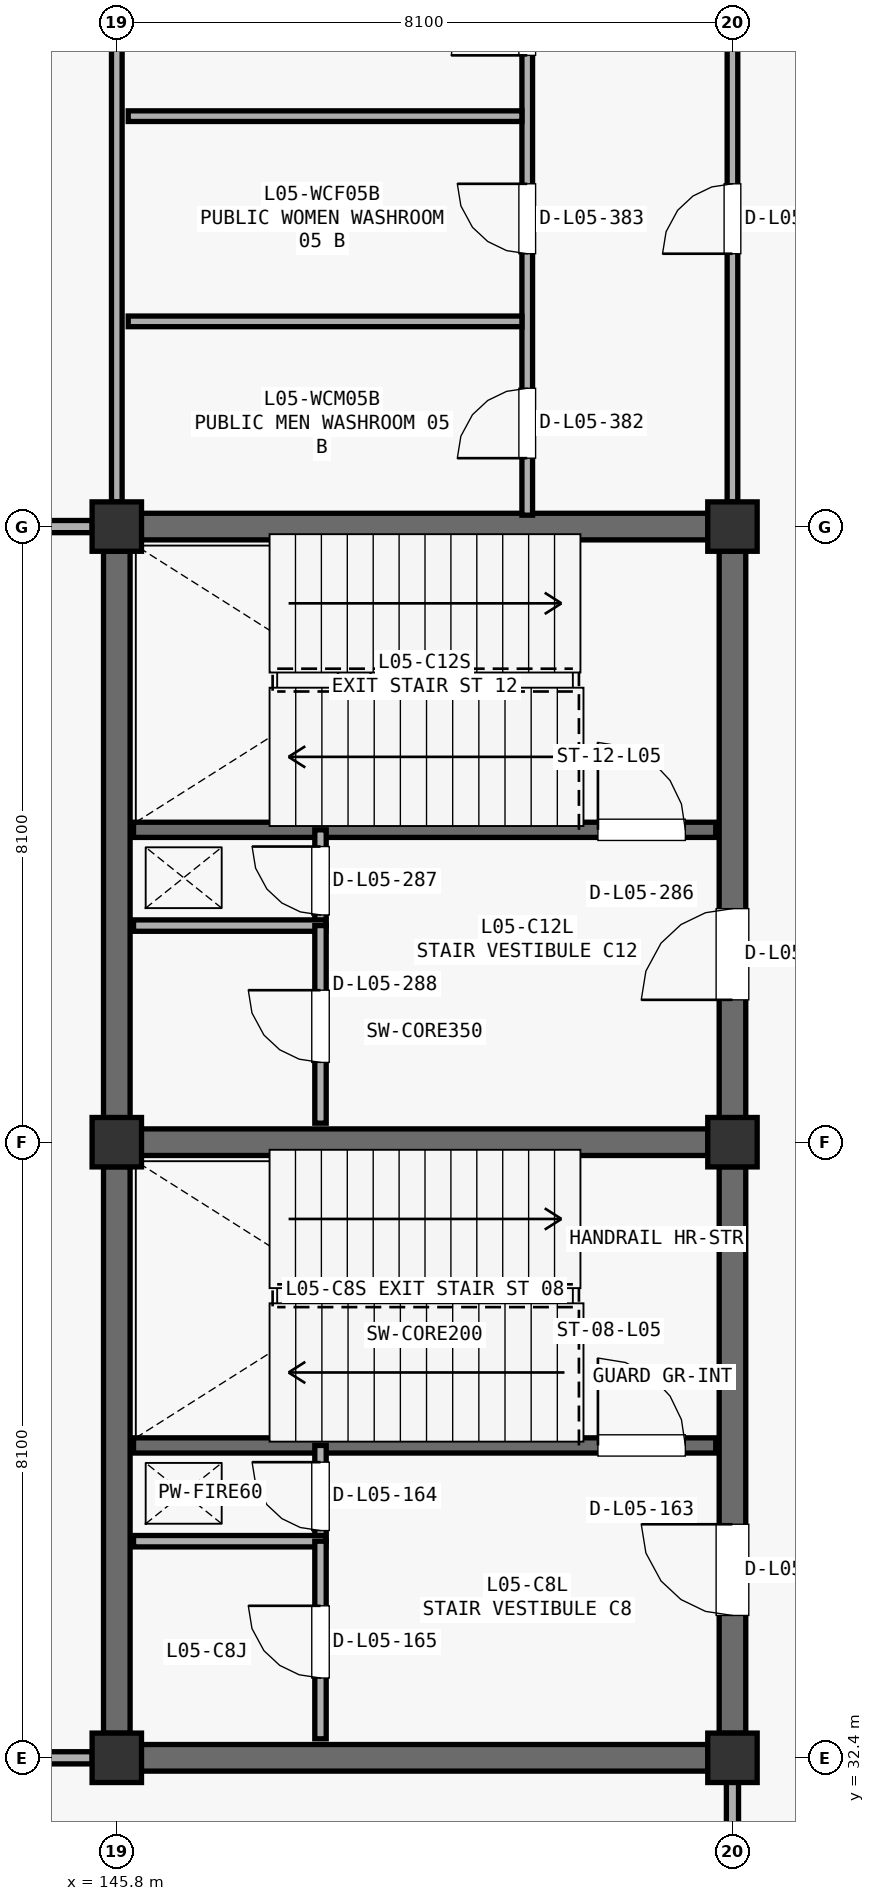
"""IFC4 building model, lengths in metres.
Left out: names, types, materials, properties, quantities, classifications, styles, units other than length and angle.
Written with IfcOpenShell. Run it as: python <this file> out.ifc"""

import sys

from ifc_helpers import new_model, si_unit, direction, frame, frame_2d, origin, origin_2d, place, context, subcontext, project, spatial, rectangle, extrude, element, fill, save


model = new_model("IFC4")
c1 = context("Model", 3, precision=1e-05, world=origin(), true_north=direction((0.0, 1.0)))
c2 = subcontext(c1, "Body", "Model", "MODEL_VIEW")
j1 = project(units=[si_unit("LENGTHUNIT", "METRE"), si_unit("PLANEANGLEUNIT", "RADIAN")], contexts=[c1])
p1 = place(None, origin())
s1 = spatial("IfcSite", under=j1, at=p1, CompositionType="ELEMENT")
p2 = place(p1, origin())
s2 = spatial("IfcBuilding", under=s1, at=p2, CompositionType="ELEMENT")
p3 = place(p2, frame((0.0, 0.0, 22.95)))
s3 = spatial("IfcBuildingStorey", under=s2, at=p3, CompositionType="ELEMENT", Elevation=22.95)
for number, where, z_axis, x_axis in (
    (1, (145.8, 32.4, 0.0), (0.0, 0.0, 1.0), (1.0, 0.0, 0.0)),
    (2, (145.8, 40.5, 0.0), (0.0, 0.0, 1.0), (1.0, 0.0, 0.0)),
    (3, (145.8, 48.6, 0.0), (0.0, 0.0, 1.0), (1.0, 0.0, 0.0)),
    (4, (153.9, 32.4, 0.0), (0.0, 0.0, 1.0), (1.0, 0.0, 0.0)),
    (5, (153.9, 40.5, 0.0), (0.0, 0.0, 1.0), (1.0, 0.0, 0.0)),
    (6, (153.9, 48.6, 0.0), (0.0, 0.0, 1.0), (1.0, 0.0, 0.0)),
):
    element("IfcColumn", number, at=place(p3, frame(where, z_axis=z_axis, x_axis=x_axis)), inside=s3, PredefinedType="COLUMN", context=c2, shape_type="SweptSolid", body=[
        extrude(rectangle(XDim=0.65, YDim=0.65, at=origin_2d()), origin(), (0.0, 0.0, 1.0), 4.42),
    ])
p4 = place(p3, frame((146.123, 40.5, 0.0), z_axis=(0.0, 0.0, 1.0), x_axis=(1.0, 0.0, 0.0)))
e7 = element("IfcWall", 7, at=p4, inside=s3, PredefinedType="SHEAR", context=c2, shape_type="SweptSolid", body=[
    extrude(rectangle(XDim=7.454, YDim=0.35, at=frame_2d((3.727, 0.0))), origin(), (0.0, 0.0, 1.0), 4.162),
])
p5 = place(p3, frame((145.8, 32.723, 0.0), z_axis=(0.0, 0.0, 1.0), x_axis=(0.0, 1.0, 0.0)))
e8 = element("IfcWall", 8, at=p5, inside=s3, PredefinedType="SHEAR", context=c2, shape_type="SweptSolid", body=[
    extrude(rectangle(XDim=7.454, YDim=0.35, at=frame_2d((3.727, 0.0))), origin(), (0.0, 0.0, 1.0), 4.162),
])
p6 = place(p3, frame((153.9, 32.723, 0.0), z_axis=(0.0, 0.0, 1.0), x_axis=(0.0, 1.0, 0.0)))
e9 = element("IfcWall", 9, at=p6, inside=s3, PredefinedType="SHEAR", context=c2, shape_type="SweptSolid", body=[
    extrude(rectangle(XDim=7.454, YDim=0.35, at=frame_2d((3.727, 0.0))), origin(), (0.0, 0.0, 1.0), 4.162),
])
p7 = place(p6, frame((1.55, 0.0, 0.0)))
e10 = element("IfcOpeningElement", 10, at=p7, cuts=e9, PredefinedType="OPENING", context=c2, shape_type="SweptSolid", body=[
    extrude(rectangle(XDim=1.2, YDim=2.2, at=frame_2d((0.6, 1.1))), frame((0.0, 0.185, 0.0), z_axis=(0.0, -1.0, 0.0), x_axis=(1.0, 0.0, 0.0)), (0.0, 0.0, 1.0), 0.37),
])
p8 = place(p3, frame((146.123, 32.4, 0.0), z_axis=(0.0, 0.0, 1.0), x_axis=(1.0, 0.0, 0.0)))
e11 = element("IfcWall", 11, at=p8, inside=s3, PredefinedType="SHEAR", context=c2, shape_type="SweptSolid", body=[
    extrude(rectangle(XDim=7.454, YDim=0.35, at=frame_2d((3.727, 0.0))), origin(), (0.0, 0.0, 1.0), 4.162),
])
p9 = place(p3, frame((146.02, 36.51, 0.0), z_axis=(0.0, 0.0, 1.0), x_axis=(1.0, 0.0, 0.0)))
e12 = element("IfcWall", 12, at=p9, inside=s3, PredefinedType="SHEAR", context=c2, shape_type="SweptSolid", body=[
    extrude(rectangle(XDim=7.66, YDim=0.2, at=frame_2d((3.83, 0.0))), origin(), (0.0, 0.0, 1.0), 4.162),
])
p10 = place(p9, frame((6.11, 0.0, 0.0)))
e13 = element("IfcOpeningElement", 13, at=p10, cuts=e12, PredefinedType="OPENING", context=c2, shape_type="SweptSolid", body=[
    extrude(rectangle(XDim=1.15, YDim=2.2, at=frame_2d((0.575, 1.1))), frame((0.0, 0.11, 0.0), z_axis=(0.0, -1.0, 0.0), x_axis=(1.0, 0.0, 0.0)), (0.0, 0.0, 1.0), 0.22),
])
p11 = place(p3, frame((148.48, 35.25, 0.0), z_axis=(0.0, 0.0, 1.0), x_axis=(0.0, 1.0, 0.0)))
e14 = element("IfcWall", 14, at=p11, inside=s3, PredefinedType="PARTITIONING", context=c2, shape_type="SweptSolid", body=[
    extrude(rectangle(XDim=1.26, YDim=0.15, at=frame_2d((0.63, 0.0))), origin(), (0.0, 0.0, 1.0), 4.162),
])
p12 = place(p11, frame((0.14, 0.0, 0.0)))
e15 = element("IfcOpeningElement", 15, at=p12, cuts=e14, PredefinedType="OPENING", context=c2, shape_type="SweptSolid", body=[
    extrude(rectangle(XDim=0.9, YDim=2.15, at=frame_2d((0.45, 1.075))), frame((0.0, 0.085, 0.0), z_axis=(0.0, -1.0, 0.0), x_axis=(1.0, 0.0, 0.0)), (0.0, 0.0, 1.0), 0.17),
])
p13 = place(p3, frame((146.02, 35.25, 0.0), z_axis=(0.0, 0.0, 1.0), x_axis=(1.0, 0.0, 0.0)))
e16 = element("IfcWall", 16, at=p13, inside=s3, PredefinedType="PARTITIONING", context=c2, shape_type="SweptSolid", body=[
    extrude(rectangle(XDim=2.53, YDim=0.15, at=frame_2d((1.265, 0.0))), origin(), (0.0, 0.0, 1.0), 4.162),
])
p14 = place(p3, frame((148.48, 32.65, 0.0), z_axis=(0.0, 0.0, 1.0), x_axis=(0.0, 1.0, 0.0)))
e17 = element("IfcWall", 17, at=p14, inside=s3, PredefinedType="PARTITIONING", context=c2, shape_type="SweptSolid", body=[
    extrude(rectangle(XDim=2.6, YDim=0.15, at=frame_2d((1.3, 0.0))), origin(), (0.0, 0.0, 1.0), 4.162),
])
p15 = place(p14, frame((0.8, 0.0, 0.0)))
e18 = element("IfcOpeningElement", 18, at=p15, cuts=e17, PredefinedType="OPENING", context=c2, shape_type="SweptSolid", body=[
    extrude(rectangle(XDim=0.95, YDim=2.15, at=frame_2d((0.475, 1.075))), frame((0.0, 0.085, 0.0), z_axis=(0.0, -1.0, 0.0), x_axis=(1.0, 0.0, 0.0)), (0.0, 0.0, 1.0), 0.17),
])
p16 = place(p3, frame((146.123, 48.6, 0.0), z_axis=(0.0, 0.0, 1.0), x_axis=(1.0, 0.0, 0.0)))
e19 = element("IfcWall", 19, at=p16, inside=s3, PredefinedType="SHEAR", context=c2, shape_type="SweptSolid", body=[
    extrude(rectangle(XDim=7.454, YDim=0.35, at=frame_2d((3.727, 0.0))), origin(), (0.0, 0.0, 1.0), 4.162),
])
p17 = place(p3, frame((145.8, 40.823, 0.0), z_axis=(0.0, 0.0, 1.0), x_axis=(0.0, 1.0, 0.0)))
e20 = element("IfcWall", 20, at=p17, inside=s3, PredefinedType="SHEAR", context=c2, shape_type="SweptSolid", body=[
    extrude(rectangle(XDim=7.454, YDim=0.35, at=frame_2d((3.727, 0.0))), origin(), (0.0, 0.0, 1.0), 4.162),
])
p18 = place(p3, frame((153.9, 40.823, 0.0), z_axis=(0.0, 0.0, 1.0), x_axis=(0.0, 1.0, 0.0)))
e21 = element("IfcWall", 21, at=p18, inside=s3, PredefinedType="SHEAR", context=c2, shape_type="SweptSolid", body=[
    extrude(rectangle(XDim=7.454, YDim=0.35, at=frame_2d((3.727, 0.0))), origin(), (0.0, 0.0, 1.0), 4.162),
])
p19 = place(p18, frame((1.55, 0.0, 0.0)))
e22 = element("IfcOpeningElement", 22, at=p19, cuts=e21, PredefinedType="OPENING", context=c2, shape_type="SweptSolid", body=[
    extrude(rectangle(XDim=1.2, YDim=2.2, at=frame_2d((0.6, 1.1))), frame((0.0, 0.185, 0.0), z_axis=(0.0, -1.0, 0.0), x_axis=(1.0, 0.0, 0.0)), (0.0, 0.0, 1.0), 0.37),
])
p20 = place(p3, frame((146.02, 44.61, 0.0), z_axis=(0.0, 0.0, 1.0), x_axis=(1.0, 0.0, 0.0)))
e23 = element("IfcWall", 23, at=p20, inside=s3, PredefinedType="SHEAR", context=c2, shape_type="SweptSolid", body=[
    extrude(rectangle(XDim=7.66, YDim=0.2, at=frame_2d((3.83, 0.0))), origin(), (0.0, 0.0, 1.0), 4.162),
])
p21 = place(p20, frame((6.11, 0.0, 0.0)))
e24 = element("IfcOpeningElement", 24, at=p21, cuts=e23, PredefinedType="OPENING", context=c2, shape_type="SweptSolid", body=[
    extrude(rectangle(XDim=1.15, YDim=2.2, at=frame_2d((0.575, 1.1))), frame((0.0, 0.11, 0.0), z_axis=(0.0, -1.0, 0.0), x_axis=(1.0, 0.0, 0.0)), (0.0, 0.0, 1.0), 0.22),
])
p22 = place(p3, frame((148.48, 43.35, 0.0), z_axis=(0.0, 0.0, 1.0), x_axis=(0.0, 1.0, 0.0)))
e25 = element("IfcWall", 25, at=p22, inside=s3, PredefinedType="PARTITIONING", context=c2, shape_type="SweptSolid", body=[
    extrude(rectangle(XDim=1.26, YDim=0.15, at=frame_2d((0.63, 0.0))), origin(), (0.0, 0.0, 1.0), 4.162),
])
p23 = place(p22, frame((0.14, 0.0, 0.0)))
e26 = element("IfcOpeningElement", 26, at=p23, cuts=e25, PredefinedType="OPENING", context=c2, shape_type="SweptSolid", body=[
    extrude(rectangle(XDim=0.9, YDim=2.15, at=frame_2d((0.45, 1.075))), frame((0.0, 0.085, 0.0), z_axis=(0.0, -1.0, 0.0), x_axis=(1.0, 0.0, 0.0)), (0.0, 0.0, 1.0), 0.17),
])
p24 = place(p3, frame((146.02, 43.35, 0.0), z_axis=(0.0, 0.0, 1.0), x_axis=(1.0, 0.0, 0.0)))
e27 = element("IfcWall", 27, at=p24, inside=s3, PredefinedType="PARTITIONING", context=c2, shape_type="SweptSolid", body=[
    extrude(rectangle(XDim=2.53, YDim=0.15, at=frame_2d((1.265, 0.0))), origin(), (0.0, 0.0, 1.0), 4.162),
])
p25 = place(p3, frame((148.48, 40.75, 0.0), z_axis=(0.0, 0.0, 1.0), x_axis=(0.0, 1.0, 0.0)))
e28 = element("IfcWall", 28, at=p25, inside=s3, PredefinedType="PARTITIONING", context=c2, shape_type="SweptSolid", body=[
    extrude(rectangle(XDim=2.6, YDim=0.15, at=frame_2d((1.3, 0.0))), origin(), (0.0, 0.0, 1.0), 4.162),
])
p26 = place(p25, frame((0.8, 0.0, 0.0)))
e29 = element("IfcOpeningElement", 29, at=p26, cuts=e28, PredefinedType="OPENING", context=c2, shape_type="SweptSolid", body=[
    extrude(rectangle(XDim=0.95, YDim=2.15, at=frame_2d((0.475, 1.075))), frame((0.0, 0.085, 0.0), z_axis=(0.0, -1.0, 0.0), x_axis=(1.0, 0.0, 0.0)), (0.0, 0.0, 1.0), 0.17),
])
p27 = place(p3, frame((145.8, 48.923, 0.0), z_axis=(0.0, 0.0, 1.0), x_axis=(0.0, 1.0, 0.0)))
e30 = element("IfcWall", 30, at=p27, inside=s3, PredefinedType="PARTITIONING", context=c2, shape_type="SweptSolid", body=[
    extrude(rectangle(XDim=7.454, YDim=0.14, at=frame_2d((3.727, 0.0))), origin(), (0.0, 0.0, 1.0), 3.31),
])
p28 = place(p3, frame((153.9, 48.923, 0.0), z_axis=(0.0, 0.0, 1.0), x_axis=(0.0, 1.0, 0.0)))
e31 = element("IfcWall", 31, at=p28, inside=s3, PredefinedType="PARTITIONING", context=c2, shape_type="SweptSolid", body=[
    extrude(rectangle(XDim=7.454, YDim=0.14, at=frame_2d((3.727, 0.0))), origin(), (0.0, 0.0, 1.0), 3.41),
])
p29 = place(p28, frame((3.267, 0.0, 0.0)))
e32 = element("IfcOpeningElement", 32, at=p29, cuts=e31, PredefinedType="OPENING", context=c2, shape_type="SweptSolid", body=[
    extrude(rectangle(XDim=0.92, YDim=2.15, at=frame_2d((0.46, 1.075))), frame((0.0, 0.08, 0.0), z_axis=(0.0, -1.0, 0.0), x_axis=(1.0, 0.0, 0.0)), (0.0, 0.0, 1.0), 0.16),
])
p30 = place(p3, frame((151.2, 48.75, 0.0), z_axis=(0.0, 0.0, 1.0), x_axis=(0.0, 1.0, 0.0)))
e33 = element("IfcWall", 33, at=p30, inside=s3, PredefinedType="PARTITIONING", context=c2, shape_type="SweptSolid", body=[
    extrude(rectangle(XDim=7.8, YDim=0.14, at=frame_2d((3.9, 0.0))), origin(), (0.0, 0.0, 1.0), 4.162),
])
p31 = place(p30, frame((0.75, 0.0, 0.0)))
e34 = element("IfcOpeningElement", 34, at=p31, cuts=e33, PredefinedType="OPENING", context=c2, shape_type="SweptSolid", body=[
    extrude(rectangle(XDim=0.92, YDim=2.15, at=frame_2d((0.46, 1.075))), frame((0.0, 0.08, 0.0), z_axis=(0.0, -1.0, 0.0), x_axis=(1.0, 0.0, 0.0)), (0.0, 0.0, 1.0), 0.16),
])
p32 = place(p30, frame((3.44, 0.0, 0.0)))
e35 = element("IfcOpeningElement", 35, at=p32, cuts=e33, PredefinedType="OPENING", context=c2, shape_type="SweptSolid", body=[
    extrude(rectangle(XDim=0.92, YDim=2.15, at=frame_2d((0.46, 1.075))), frame((0.0, 0.08, 0.0), z_axis=(0.0, -1.0, 0.0), x_axis=(1.0, 0.0, 0.0)), (0.0, 0.0, 1.0), 0.16),
])
p33 = place(p30, frame((6.05, 0.0, 0.0)))
e36 = element("IfcOpeningElement", 36, at=p33, cuts=e33, PredefinedType="OPENING", context=c2, shape_type="SweptSolid", body=[
    extrude(rectangle(XDim=1.0, YDim=2.15, at=frame_2d((0.5, 1.075))), frame((0.0, 0.08, 0.0), z_axis=(0.0, -1.0, 0.0), x_axis=(1.0, 0.0, 0.0)), (0.0, 0.0, 1.0), 0.16),
])
for number, where, z_axis, x_axis in (
    (37, (145.95, 51.3, 0.0), (0.0, 0.0, 1.0), (1.0, 0.0, 0.0)),
    (38, (145.95, 54.0, 0.0), (0.0, 0.0, 1.0), (1.0, 0.0, 0.0)),
):
    element("IfcWall", number, at=place(p3, frame(where, z_axis=z_axis, x_axis=x_axis)), inside=s3, PredefinedType="PARTITIONING", context=c2, shape_type="SweptSolid", body=[
        extrude(rectangle(XDim=5.18, YDim=0.14, at=frame_2d((2.59, 0.0))), origin(), (0.0, 0.0, 1.0), 4.162),
    ])
p34 = place(p3, frame((153.9, 24.623, 0.0), z_axis=(0.0, 0.0, 1.0), x_axis=(0.0, 1.0, 0.0)))
e39 = element("IfcWall", 39, at=p34, inside=s3, PredefinedType="PARTITIONING", context=c2, shape_type="SweptSolid", body=[
    extrude(rectangle(XDim=7.454, YDim=0.16, at=frame_2d((3.727, 0.0))), origin(), (0.0, 0.0, 1.0), 3.562),
])
p35 = place(p3, frame((138.023, 32.4, 0.0), z_axis=(0.0, 0.0, 1.0), x_axis=(1.0, 0.0, 0.0)))
e40 = element("IfcWall", 40, at=p35, inside=s3, PredefinedType="PARTITIONING", context=c2, shape_type="SweptSolid", body=[
    extrude(rectangle(XDim=7.454, YDim=0.16, at=frame_2d((3.727, 0.0))), origin(), (0.0, 0.0, 1.0), 3.562),
])
p36 = place(p3, frame((138.023, 48.6, 0.0), z_axis=(0.0, 0.0, 1.0), x_axis=(1.0, 0.0, 0.0)))
e41 = element("IfcWall", 41, at=p36, inside=s3, PredefinedType="PARTITIONING", context=c2, shape_type="SweptSolid", body=[
    extrude(rectangle(XDim=7.454, YDim=0.16, at=frame_2d((3.727, 0.0))), origin(), (0.0, 0.0, 1.0), 3.212),
])
p37 = place(p36, frame((2.937, 0.0, 0.0)))
e42 = element("IfcOpeningElement", 42, at=p37, cuts=e41, PredefinedType="OPENING", context=c2, shape_type="SweptSolid", body=[
    extrude(rectangle(XDim=1.58, YDim=2.2, at=frame_2d((0.79, 1.1))), frame((0.0, 0.09, 0.0), z_axis=(0.0, -1.0, 0.0), x_axis=(1.0, 0.0, 0.0)), (0.0, 0.0, 1.0), 0.18),
])
p38 = place(p7, origin())
e43 = element("IfcDoor", 43, at=p38, inside=s3, OperationType="SINGLE_SWING_RIGHT", PredefinedType="DOOR", context=c2, shape_type="SweptSolid", body=[
    extrude(rectangle(XDim=1.2, YDim=2.2, at=frame_2d((0.6, 1.1))), frame((0.0, 0.025, 0.0), z_axis=(0.0, -1.0, 0.0), x_axis=(1.0, 0.0, 0.0)), (0.0, 0.0, 1.0), 0.05),
])
fill(e10, e43)
p39 = place(p10, origin())
e44 = element("IfcDoor", 44, at=p39, inside=s3, OperationType="SINGLE_SWING_LEFT", PredefinedType="DOOR", context=c2, shape_type="SweptSolid", body=[
    extrude(rectangle(XDim=1.15, YDim=2.2, at=frame_2d((0.575, 1.1))), frame((0.0, 0.025, 0.0), z_axis=(0.0, -1.0, 0.0), x_axis=(1.0, 0.0, 0.0)), (0.0, 0.0, 1.0), 0.05),
])
fill(e13, e44)
p40 = place(p12, origin())
e45 = element("IfcDoor", 45, at=p40, inside=s3, OperationType="SINGLE_SWING_RIGHT", PredefinedType="DOOR", context=c2, shape_type="SweptSolid", body=[
    extrude(rectangle(XDim=0.9, YDim=2.15, at=frame_2d((0.45, 1.075))), frame((0.0, 0.025, 0.0), z_axis=(0.0, -1.0, 0.0), x_axis=(1.0, 0.0, 0.0)), (0.0, 0.0, 1.0), 0.05),
])
fill(e15, e45)
p41 = place(p15, origin())
e46 = element("IfcDoor", 46, at=p41, inside=s3, OperationType="SINGLE_SWING_RIGHT", PredefinedType="DOOR", context=c2, shape_type="SweptSolid", body=[
    extrude(rectangle(XDim=0.95, YDim=2.15, at=frame_2d((0.475, 1.075))), frame((0.0, 0.025, 0.0), z_axis=(0.0, -1.0, 0.0), x_axis=(1.0, 0.0, 0.0)), (0.0, 0.0, 1.0), 0.05),
])
fill(e18, e46)
p42 = place(p19, origin())
e47 = element("IfcDoor", 47, at=p42, inside=s3, OperationType="SINGLE_SWING_LEFT", PredefinedType="DOOR", context=c2, shape_type="SweptSolid", body=[
    extrude(rectangle(XDim=1.2, YDim=2.2, at=frame_2d((0.6, 1.1))), frame((0.0, 0.025, 0.0), z_axis=(0.0, -1.0, 0.0), x_axis=(1.0, 0.0, 0.0)), (0.0, 0.0, 1.0), 0.05),
])
fill(e22, e47)
p43 = place(p21, origin())
e48 = element("IfcDoor", 48, at=p43, inside=s3, OperationType="SINGLE_SWING_LEFT", PredefinedType="DOOR", context=c2, shape_type="SweptSolid", body=[
    extrude(rectangle(XDim=1.15, YDim=2.2, at=frame_2d((0.575, 1.1))), frame((0.0, 0.025, 0.0), z_axis=(0.0, -1.0, 0.0), x_axis=(1.0, 0.0, 0.0)), (0.0, 0.0, 1.0), 0.05),
])
fill(e24, e48)
p44 = place(p23, origin())
e49 = element("IfcDoor", 49, at=p44, inside=s3, OperationType="SINGLE_SWING_RIGHT", PredefinedType="DOOR", context=c2, shape_type="SweptSolid", body=[
    extrude(rectangle(XDim=0.9, YDim=2.15, at=frame_2d((0.45, 1.075))), frame((0.0, 0.025, 0.0), z_axis=(0.0, -1.0, 0.0), x_axis=(1.0, 0.0, 0.0)), (0.0, 0.0, 1.0), 0.05),
])
fill(e26, e49)
p45 = place(p26, origin())
e50 = element("IfcDoor", 50, at=p45, inside=s3, OperationType="SINGLE_SWING_RIGHT", PredefinedType="DOOR", context=c2, shape_type="SweptSolid", body=[
    extrude(rectangle(XDim=0.95, YDim=2.15, at=frame_2d((0.475, 1.075))), frame((0.0, 0.025, 0.0), z_axis=(0.0, -1.0, 0.0), x_axis=(1.0, 0.0, 0.0)), (0.0, 0.0, 1.0), 0.05),
])
fill(e29, e50)
p46 = place(p29, origin())
e51 = element("IfcDoor", 51, at=p46, inside=s3, OperationType="SINGLE_SWING_LEFT", PredefinedType="DOOR", context=c2, shape_type="SweptSolid", body=[
    extrude(rectangle(XDim=0.92, YDim=2.15, at=frame_2d((0.46, 1.075))), frame((0.0, 0.025, 0.0), z_axis=(0.0, -1.0, 0.0), x_axis=(1.0, 0.0, 0.0)), (0.0, 0.0, 1.0), 0.05),
])
fill(e32, e51)
p47 = place(p31, origin())
e52 = element("IfcDoor", 52, at=p47, inside=s3, OperationType="SINGLE_SWING_LEFT", PredefinedType="DOOR", context=c2, shape_type="SweptSolid", body=[
    extrude(rectangle(XDim=0.92, YDim=2.15, at=frame_2d((0.46, 1.075))), frame((0.0, 0.025, 0.0), z_axis=(0.0, -1.0, 0.0), x_axis=(1.0, 0.0, 0.0)), (0.0, 0.0, 1.0), 0.05),
])
fill(e34, e52)
p48 = place(p32, origin())
e53 = element("IfcDoor", 53, at=p48, inside=s3, OperationType="SINGLE_SWING_RIGHT", PredefinedType="DOOR", context=c2, shape_type="SweptSolid", body=[
    extrude(rectangle(XDim=0.92, YDim=2.15, at=frame_2d((0.46, 1.075))), frame((0.0, 0.025, 0.0), z_axis=(0.0, -1.0, 0.0), x_axis=(1.0, 0.0, 0.0)), (0.0, 0.0, 1.0), 0.05),
])
fill(e35, e53)
p49 = place(p33, origin())
e54 = element("IfcDoor", 54, at=p49, inside=s3, OperationType="SINGLE_SWING_LEFT", PredefinedType="DOOR", context=c2, shape_type="SweptSolid", body=[
    extrude(rectangle(XDim=1.0, YDim=2.15, at=frame_2d((0.5, 1.075))), frame((0.0, 0.025, 0.0), z_axis=(0.0, -1.0, 0.0), x_axis=(1.0, 0.0, 0.0)), (0.0, 0.0, 1.0), 0.05),
])
fill(e36, e54)
save(model, sys.argv[1])
